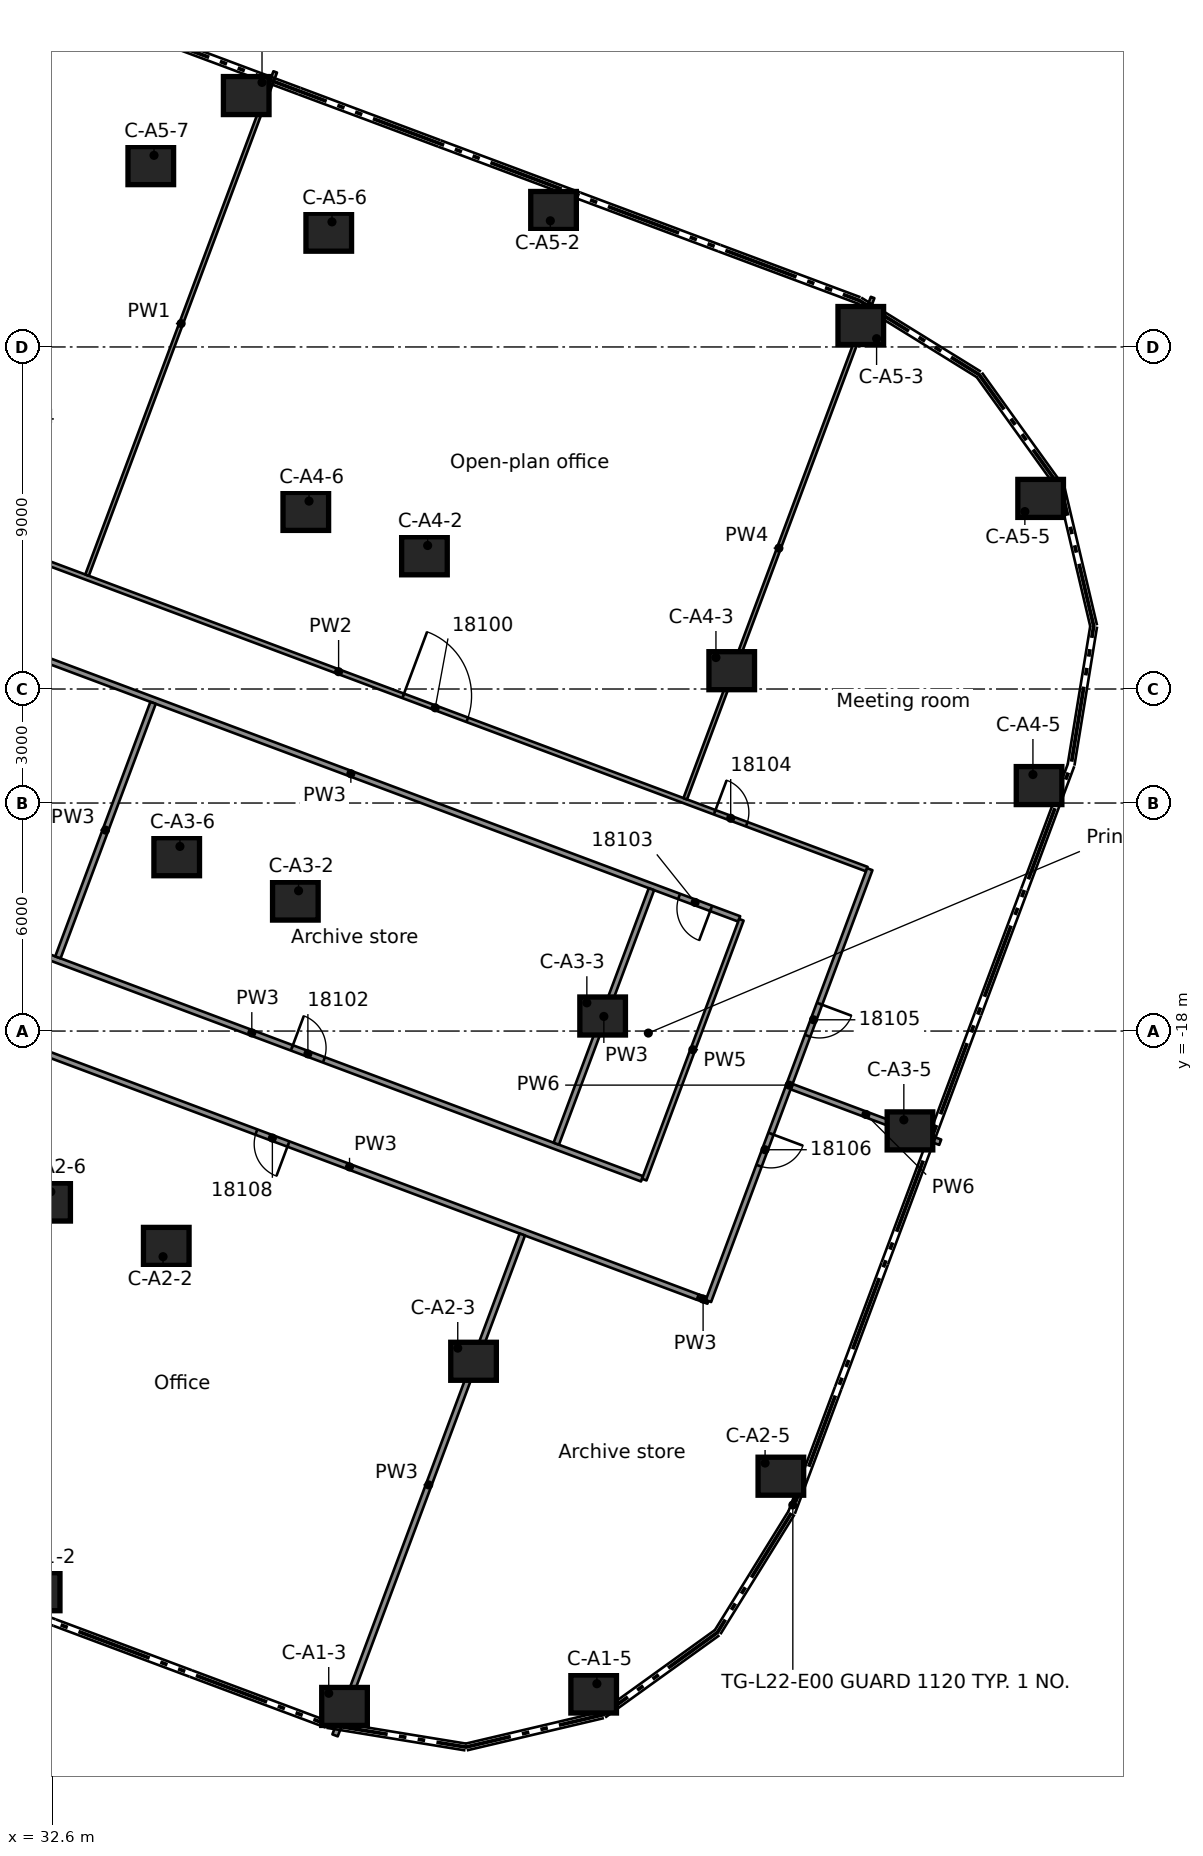
"""IFC4 building model, lengths in metres.
Left out: names, types, materials, properties, quantities, classifications, styles, units other than length and angle.
Written with IfcOpenShell. Run it as: python <this file> out.ifc"""

import sys

from ifc_helpers import new_model, si_unit, direction, frame, frame_2d, origin, origin_2d, place, context, subcontext, project, spatial, rectangle, extrude, element, fill, save


model = new_model("IFC4")
c1 = context("Model", 3, precision=1e-05, world=origin(), true_north=direction((0.0, 1.0)))
c2 = subcontext(c1, "Body", "Model", "MODEL_VIEW")
j1 = project(units=[si_unit("LENGTHUNIT", "METRE"), si_unit("PLANEANGLEUNIT", "RADIAN")], contexts=[c1])
p1 = place(None, origin())
s1 = spatial("IfcSite", under=j1, at=p1, CompositionType="ELEMENT")
p2 = place(p1, origin())
s2 = spatial("IfcBuilding", under=s1, at=p2, CompositionType="ELEMENT")
p3 = place(p2, frame((0.0, 0.0, 91.2)))
s3 = spatial("IfcBuildingStorey", under=s2, at=p3, CompositionType="ELEMENT", Elevation=91.2)
for number, where, z_axis, x_axis in (
    (1, (32.203, -32.752, 0.0), (0.0, 0.0, 1.0), (1.0, 0.0, 0.0)),
    (2, (40.291, -35.771, 0.0), (0.0, 0.0, 1.0), (1.0, 0.0, 0.0)),
    (3, (46.847, -35.444, 0.0), (0.0, 0.0, 1.0), (1.0, 0.0, 0.0)),
    (4, (35.6, -23.666, 0.0), (0.0, 0.0, 1.0), (1.0, 0.0, 0.0)),
    (5, (43.686, -26.689, 0.0), (0.0, 0.0, 1.0), (1.0, 0.0, 0.0)),
    (6, (51.773, -29.713, 0.0), (0.0, 0.0, 1.0), (1.0, 0.0, 0.0)),
    (7, (32.478, -22.499, 0.0), (0.0, 0.0, 1.0), (1.0, 0.0, 0.0)),
    (8, (38.997, -14.58, 0.0), (0.0, 0.0, 1.0), (1.0, 0.0, 0.0)),
    (9, (47.083, -17.604, 0.0), (0.0, 0.0, 1.0), (1.0, 0.0, 0.0)),
    (10, (55.17, -20.627, 0.0), (0.0, 0.0, 1.0), (1.0, 0.0, 0.0)),
    (11, (35.875, -13.413, 0.0), (0.0, 0.0, 1.0), (1.0, 0.0, 0.0)),
    (12, (42.394, -5.495, 0.0), (0.0, 0.0, 1.0), (1.0, 0.0, 0.0)),
    (13, (50.48, -8.518, 0.0), (0.0, 0.0, 1.0), (1.0, 0.0, 0.0)),
    (14, (58.567, -11.541, 0.0), (0.0, 0.0, 1.0), (1.0, 0.0, 0.0)),
    (15, (39.272, -4.327, 0.0), (0.0, 0.0, 1.0), (1.0, 0.0, 0.0)),
    (16, (37.704, 6.615, 0.0), (0.0, 0.0, 1.0), (1.0, 0.0, 0.0)),
    (17, (45.791, 3.591, 0.0), (0.0, 0.0, 1.0), (1.0, 0.0, 0.0)),
    (18, (53.876, 0.564, 0.0), (0.0, 0.0, 1.0), (1.0, 0.0, 0.0)),
    (19, (58.609, -3.985, 0.0), (0.0, 0.0, 1.0), (1.0, 0.0, 0.0)),
    (20, (39.876, 3.02, 0.0), (0.0, 0.0, 1.0), (1.0, 0.0, 0.0)),
    (21, (35.193, 4.771, 0.0), (0.0, 0.0, 1.0), (1.0, 0.0, 0.0)),
):
    element("IfcColumn", number, at=place(p3, frame(where, z_axis=z_axis, x_axis=x_axis)), inside=s3, PredefinedType="COLUMN", context=c2, shape_type="SweptSolid", body=[
        extrude(rectangle(XDim=1.2, YDim=1.0, at=origin_2d()), origin(), (0.0, 0.0, 1.0), 3.5),
    ])
p4 = place(p3, frame((49.587, -24.999, 0.0), z_axis=(0.0, 0.0, 1.0), x_axis=(0.93595848705, -0.352110366957, 0.0)))
e22 = element("IfcWall", 22, at=p4, inside=s3, PredefinedType="PARTITIONING", context=c2, shape_type="SweptSolid", body=[
    extrude(rectangle(XDim=0.298, YDim=0.15, at=frame_2d((0.149, 0.0))), origin(), (0.0, 0.0, 1.0), 3.08),
])
p5 = place(p3, frame((49.585, -25.001, 0.0), z_axis=(0.0, 0.0, 1.0), x_axis=(-0.936641004212, 0.350290778111, 0.0)))
e23 = element("IfcWall", 23, at=p5, inside=s3, PredefinedType="PARTITIONING", context=c2, shape_type="SweptSolid", body=[
    extrude(rectangle(XDim=24.457, YDim=0.15, at=frame_2d((12.228, 0.0))), origin(), (0.0, 0.0, 1.0), 3.08),
])
p6 = place(p5, frame((21.25, 0.0, 0.0)))
e24 = element("IfcOpeningElement", 24, at=p6, cuts=e23, PredefinedType="OPENING", context=c2, shape_type="SweptSolid", body=[
    extrude(rectangle(XDim=0.9, YDim=2.1, at=frame_2d((0.45, 1.05))), frame((0.0, 0.085, 0.0), z_axis=(0.0, -1.0, 0.0), x_axis=(1.0, 0.0, 0.0)), (0.0, 0.0, 1.0), 0.17),
])
p7 = place(p5, frame((11.5, 0.0, 0.0)))
e25 = element("IfcOpeningElement", 25, at=p7, cuts=e23, PredefinedType="OPENING", context=c2, shape_type="SweptSolid", body=[
    extrude(rectangle(XDim=0.9, YDim=2.1, at=frame_2d((0.45, 1.05))), frame((0.0, 0.085, 0.0), z_axis=(0.0, -1.0, 0.0), x_axis=(1.0, 0.0, 0.0)), (0.0, 0.0, 1.0), 0.17),
])
p8 = place(p3, frame((27.583, -14.209, 0.0), z_axis=(0.0, 0.0, 1.0), x_axis=(0.936658709203, -0.350243433164, 0.0)))
e26 = element("IfcWall", 26, at=p8, inside=s3, PredefinedType="PARTITIONING", context=c2, shape_type="SweptSolid", body=[
    extrude(rectangle(XDim=21.925, YDim=0.15, at=frame_2d((10.962, 0.0))), origin(), (0.0, 0.0, 1.0), 3.08),
])
p9 = place(p8, frame((2.288, 0.0, 0.0)))
e27 = element("IfcOpeningElement", 27, at=p9, cuts=e26, PredefinedType="OPENING", context=c2, shape_type="SweptSolid", body=[
    extrude(rectangle(XDim=0.9, YDim=2.1, at=frame_2d((0.45, 1.05))), frame((0.0, 0.085, 0.0), z_axis=(0.0, -1.0, 0.0), x_axis=(1.0, 0.0, 0.0)), (0.0, 0.0, 1.0), 0.17),
])
p10 = place(p8, frame((12.088, 0.0, 0.0)))
e28 = element("IfcOpeningElement", 28, at=p10, cuts=e26, PredefinedType="OPENING", context=c2, shape_type="SweptSolid", body=[
    extrude(rectangle(XDim=0.9, YDim=2.1, at=frame_2d((0.45, 1.05))), frame((0.0, 0.085, 0.0), z_axis=(0.0, -1.0, 0.0), x_axis=(1.0, 0.0, 0.0)), (0.0, 0.0, 1.0), 0.17),
])
p11 = place(p3, frame((52.056, -19.463, 0.0), z_axis=(0.0, 0.0, 1.0), x_axis=(0.936655632934, -0.350251659943, 0.0)))
e29 = element("IfcWall", 29, at=p11, inside=s3, PredefinedType="PARTITIONING", context=c2, shape_type="SweptSolid", body=[
    extrude(rectangle(XDim=4.175, YDim=0.15, at=frame_2d((2.087, 0.0))), origin(), (0.0, 0.0, 1.0), 2.469),
])
p12 = place(p3, frame((50.676, -15.049, 0.0), z_axis=(0.0, 0.0, 1.0), x_axis=(-0.936701134279, 0.350129954505, 0.0)))
e30 = element("IfcWall", 30, at=p12, inside=s3, PredefinedType="PARTITIONING", context=c2, shape_type="SweptSolid", body=[
    extrude(rectangle(XDim=21.818, YDim=0.15, at=frame_2d((10.909, 0.0))), origin(), (0.0, 0.0, 1.0), 3.08),
])
p13 = place(p12, frame((0.788, 0.0, 0.0)))
e31 = element("IfcOpeningElement", 31, at=p13, cuts=e30, PredefinedType="OPENING", context=c2, shape_type="SweptSolid", body=[
    extrude(rectangle(XDim=0.9, YDim=2.1, at=frame_2d((0.45, 1.05))), frame((0.0, 0.085, 0.0), z_axis=(0.0, -1.0, 0.0), x_axis=(1.0, 0.0, 0.0)), (0.0, 0.0, 1.0), 0.17),
])
p14 = place(p3, frame((30.869, -5.082, 0.0), z_axis=(0.0, 0.0, 1.0), x_axis=(0.936726175225, -0.350062955264, 0.0)))
e32 = element("IfcWall", 32, at=p14, inside=s3, PredefinedType="PARTITIONING", context=c2, shape_type="SweptSolid", body=[
    extrude(rectangle(XDim=24.73, YDim=0.125, at=frame_2d((12.365, 0.0))), origin(), (0.0, 0.0, 1.0), 3.08),
])
p15 = place(p14, frame((11.706, 0.0, 0.0)))
e33 = element("IfcOpeningElement", 33, at=p15, cuts=e32, PredefinedType="OPENING", context=c2, shape_type="SweptSolid", body=[
    extrude(rectangle(XDim=1.8, YDim=2.1, at=frame_2d((0.9, 1.05))), frame((0.0, 0.073, 0.0), z_axis=(0.0, -1.0, 0.0), x_axis=(1.0, 0.0, 0.0)), (0.0, 0.0, 1.0), 0.145),
])
p16 = place(p14, frame((20.457, 0.0, 0.0)))
e34 = element("IfcOpeningElement", 34, at=p16, cuts=e32, PredefinedType="OPENING", context=c2, shape_type="SweptSolid", body=[
    extrude(rectangle(XDim=0.9, YDim=2.1, at=frame_2d((0.45, 1.05))), frame((0.0, 0.073, 0.0), z_axis=(0.0, -1.0, 0.0), x_axis=(1.0, 0.0, 0.0)), (0.0, 0.0, 1.0), 0.145),
])
p17 = place(p3, frame((54.113, -13.741, 0.0), z_axis=(0.0, 0.0, 1.0), x_axis=(-0.350035835617, -0.936736309632, 0.0)))
e35 = element("IfcWall", 35, at=p17, inside=s3, PredefinedType="PARTITIONING", context=c2, shape_type="SweptSolid", body=[
    extrude(rectangle(XDim=12.13, YDim=0.15, at=frame_2d((6.065, 0.0))), origin(), (0.0, 0.0, 1.0), 2.469),
])
p18 = place(p17, frame((3.78, 0.0, 0.0)))
e36 = element("IfcOpeningElement", 36, at=p18, cuts=e35, PredefinedType="OPENING", context=c2, shape_type="SweptSolid", body=[
    extrude(rectangle(XDim=0.9, YDim=2.1, at=frame_2d((0.45, 1.05))), frame((0.0, 0.085, 0.0), z_axis=(0.0, -1.0, 0.0), x_axis=(1.0, 0.0, 0.0)), (0.0, 0.0, 1.0), 0.17),
])
p19 = place(p17, frame((7.43, 0.0, 0.0)))
e37 = element("IfcOpeningElement", 37, at=p19, cuts=e35, PredefinedType="OPENING", context=c2, shape_type="SweptSolid", body=[
    extrude(rectangle(XDim=0.9, YDim=2.1, at=frame_2d((0.45, 1.05))), frame((0.0, 0.085, 0.0), z_axis=(0.0, -1.0, 0.0), x_axis=(1.0, 0.0, 0.0)), (0.0, 0.0, 1.0), 0.17),
])
p20 = place(p3, frame((48.178, -21.909, 0.0), z_axis=(0.0, 0.0, 1.0), x_axis=(0.350170212359, 0.93668608529, 0.0)))
e38 = element("IfcWall", 38, at=p20, inside=s3, PredefinedType="PARTITIONING", context=c2, shape_type="SweptSolid", body=[
    extrude(rectangle(XDim=7.299, YDim=0.125, at=frame_2d((3.649, 0.0))), origin(), (0.0, 0.0, 1.0), 2.469),
])
p21 = place(p3, frame((40.042, -36.532, 0.0), z_axis=(0.0, 0.0, 1.0), x_axis=(0.350242868869, 0.936658920209, 0.0)))
e39 = element("IfcWall", 39, at=p21, inside=s3, PredefinedType="PARTITIONING", context=c2, shape_type="SweptSolid", body=[
    extrude(rectangle(XDim=14.07, YDim=0.15, at=frame_2d((7.035, 0.0))), origin(), (0.0, 0.0, 1.0), 3.08),
])
p22 = place(p3, frame((45.863, -20.964, 0.0), z_axis=(0.0, 0.0, 1.0), x_axis=(0.35020646324, 0.936672532481, 0.0)))
e40 = element("IfcWall", 40, at=p22, inside=s3, PredefinedType="PARTITIONING", context=c2, shape_type="SweptSolid", body=[
    extrude(rectangle(XDim=7.15, YDim=0.15, at=frame_2d((3.575, 0.0))), origin(), (0.0, 0.0, 1.0), 3.08),
])
p23 = place(p3, frame((49.256, -11.889, 0.0), z_axis=(0.0, 0.0, 1.0), x_axis=(0.35014670301, 0.936694873676, 0.0)))
e41 = element("IfcWall", 41, at=p23, inside=s3, PredefinedType="PARTITIONING", context=c2, shape_type="SweptSolid", body=[
    extrude(rectangle(XDim=14.083, YDim=0.1, at=frame_2d((7.041, 0.0))), origin(), (0.0, 0.0, 1.0), 2.445),
])
p24 = place(p3, frame((32.749, -16.061, 0.0), z_axis=(0.0, 0.0, 1.0), x_axis=(0.35020646324, 0.936672532481, 0.0)))
e42 = element("IfcWall", 42, at=p24, inside=s3, PredefinedType="PARTITIONING", context=c2, shape_type="SweptSolid", body=[
    extrude(rectangle(XDim=7.15, YDim=0.15, at=frame_2d((3.575, 0.0))), origin(), (0.0, 0.0, 1.0), 3.08),
])
p25 = place(p3, frame((33.516, -6.004, 0.0), z_axis=(0.0, 0.0, 1.0), x_axis=(0.350228055147, 0.936664459338, 0.0)))
e43 = element("IfcWall", 43, at=p25, inside=s3, PredefinedType="PARTITIONING", context=c2, shape_type="SweptSolid", body=[
    extrude(rectangle(XDim=14.136, YDim=0.1, at=frame_2d((7.068, 0.0))), origin(), (0.0, 0.0, 1.0), 3.08),
])
p26 = place(p15, origin())
e44 = element("IfcDoor", 44, at=p26, inside=s3, OperationType="DOUBLE_DOOR_SINGLE_SWING", PredefinedType="DOOR", context=c2, shape_type="SweptSolid", body=[
    extrude(rectangle(XDim=1.8, YDim=2.1, at=frame_2d((0.9, 1.05))), frame((0.0, 0.025, 0.0), z_axis=(0.0, -1.0, 0.0), x_axis=(1.0, 0.0, 0.0)), (0.0, 0.0, 1.0), 0.05),
])
fill(e33, e44)
p27 = place(p10, origin())
e45 = element("IfcDoor", 45, at=p27, inside=s3, OperationType="SINGLE_SWING_RIGHT", PredefinedType="DOOR", context=c2, shape_type="SweptSolid", body=[
    extrude(rectangle(XDim=0.9, YDim=2.1, at=frame_2d((0.45, 1.05))), frame((0.0, 0.025, 0.0), z_axis=(0.0, -1.0, 0.0), x_axis=(1.0, 0.0, 0.0)), (0.0, 0.0, 1.0), 0.05),
])
fill(e28, e45)
p28 = place(p13, origin())
e46 = element("IfcDoor", 46, at=p28, inside=s3, OperationType="SINGLE_SWING_LEFT", PredefinedType="DOOR", context=c2, shape_type="SweptSolid", body=[
    extrude(rectangle(XDim=0.9, YDim=2.1, at=frame_2d((0.45, 1.05))), frame((0.0, 0.025, 0.0), z_axis=(0.0, -1.0, 0.0), x_axis=(1.0, 0.0, 0.0)), (0.0, 0.0, 1.0), 0.05),
])
fill(e31, e46)
p29 = place(p16, origin())
e47 = element("IfcDoor", 47, at=p29, inside=s3, OperationType="SINGLE_SWING_RIGHT", PredefinedType="DOOR", context=c2, shape_type="SweptSolid", body=[
    extrude(rectangle(XDim=0.9, YDim=2.1, at=frame_2d((0.45, 1.05))), frame((0.0, 0.025, 0.0), z_axis=(0.0, -1.0, 0.0), x_axis=(1.0, 0.0, 0.0)), (0.0, 0.0, 1.0), 0.05),
])
fill(e34, e47)
p30 = place(p18, origin())
e48 = element("IfcDoor", 48, at=p30, inside=s3, OperationType="SINGLE_SWING_LEFT", PredefinedType="DOOR", context=c2, shape_type="SweptSolid", body=[
    extrude(rectangle(XDim=0.9, YDim=2.1, at=frame_2d((0.45, 1.05))), frame((0.0, 0.025, 0.0), z_axis=(0.0, -1.0, 0.0), x_axis=(1.0, 0.0, 0.0)), (0.0, 0.0, 1.0), 0.05),
])
fill(e36, e48)
p31 = place(p19, origin())
e49 = element("IfcDoor", 49, at=p31, inside=s3, OperationType="SINGLE_SWING_RIGHT", PredefinedType="DOOR", context=c2, shape_type="SweptSolid", body=[
    extrude(rectangle(XDim=0.9, YDim=2.1, at=frame_2d((0.45, 1.05))), frame((0.0, 0.025, 0.0), z_axis=(0.0, -1.0, 0.0), x_axis=(1.0, 0.0, 0.0)), (0.0, 0.0, 1.0), 0.05),
])
fill(e37, e49)
p32 = place(p7, origin())
e50 = element("IfcDoor", 50, at=p32, inside=s3, OperationType="SINGLE_SWING_LEFT", PredefinedType="DOOR", context=c2, shape_type="SweptSolid", body=[
    extrude(rectangle(XDim=0.9, YDim=2.1, at=frame_2d((0.45, 1.05))), frame((0.0, 0.025, 0.0), z_axis=(0.0, -1.0, 0.0), x_axis=(1.0, 0.0, 0.0)), (0.0, 0.0, 1.0), 0.05),
])
fill(e25, e50)
save(model, sys.argv[1])
